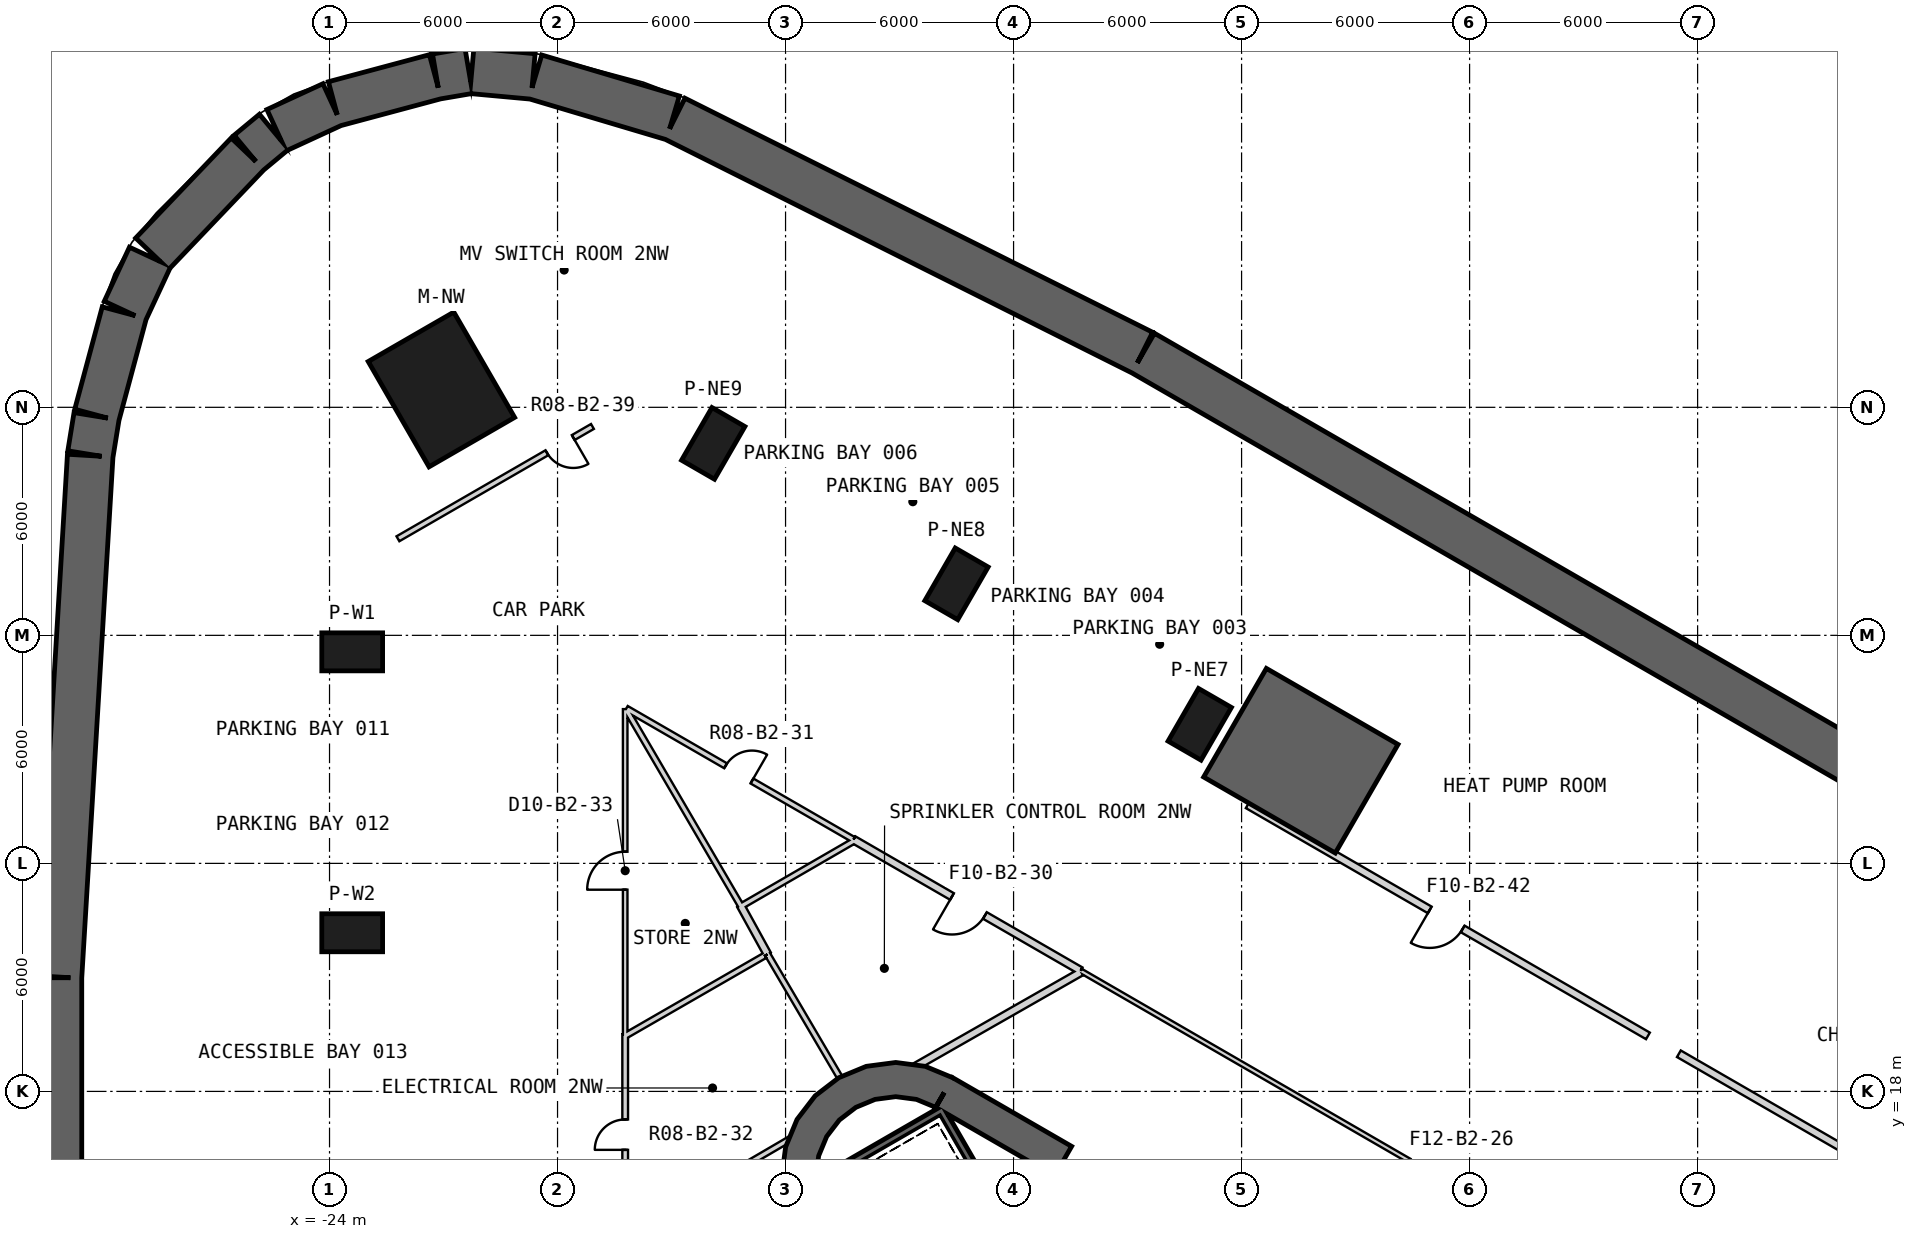
"""IFC4 building model, lengths in metres.
Left out: names, types, materials, properties, quantities, classifications, styles, units other than length and angle.
Written with IfcOpenShell. Run it as: python <this file> out.ifc"""

import sys

from ifc_helpers import new_model, si_unit, direction, frame, frame_2d, origin, origin_2d, place, context, subcontext, project, spatial, polyline, rectangle, outline, extrude, element, fill, save


model = new_model("IFC4")
c1 = context("Model", 3, precision=1e-05, world=origin(), true_north=direction((0.0, 1.0)))
c2 = subcontext(c1, "Body", "Model", "MODEL_VIEW")
j1 = project(units=[si_unit("LENGTHUNIT", "METRE"), si_unit("PLANEANGLEUNIT", "RADIAN")], contexts=[c1])
p1 = place(None, origin())
s1 = spatial("IfcSite", under=j1, at=p1, CompositionType="ELEMENT")
p2 = place(p1, origin())
s2 = spatial("IfcBuilding", under=s1, at=p2, CompositionType="ELEMENT")
p3 = place(p2, frame((0.0, 0.0, -11.0)))
s3 = spatial("IfcBuildingStorey", under=s2, at=p3, CompositionType="ELEMENT", Elevation=-11.0)
p4 = place(p3, frame((-31.117, -20.99, -0.4), z_axis=(0.0, 0.0, 1.0), x_axis=(-6.9786511e-05, 0.999999997565, 0.0)))
e1 = element("IfcWall", 1, at=p4, inside=s3, PredefinedType="SHEAR", context=c2, shape_type="SweptSolid", body=[
    extrude(rectangle(XDim=41.981, YDim=1.2, at=frame_2d((20.99, 0.0))), origin(), (0.0, 0.0, 1.0), 5.9),
])
p5 = place(p3, frame((-31.119, 21.009, -0.4), z_axis=(0.0, 0.0, 1.0), x_axis=(0.059805921037, 0.998210023897, 0.0)))
e2 = element("IfcWall", 2, at=p5, inside=s3, PredefinedType="SHEAR", context=c2, shape_type="SweptSolid", body=[
    extrude(rectangle(XDim=13.745, YDim=1.2, at=frame_2d((6.873, 0.0))), origin(), (0.0, 0.0, 1.0), 5.9),
])
p6 = place(p3, frame((-30.294, 34.759, -0.4), z_axis=(0.0, 0.0, 1.0), x_axis=(0.16003956503, 0.987110600503, 0.0)))
e3 = element("IfcWall", 3, at=p6, inside=s3, PredefinedType="SHEAR", context=c2, shape_type="SweptSolid", body=[
    extrude(rectangle(XDim=1.018, YDim=1.2, at=frame_2d((0.509, 0.0))), origin(), (0.0, 0.0, 1.0), 5.9),
])
p7 = place(p3, frame((-30.125, 35.793, -0.4), z_axis=(0.0, 0.0, 1.0), x_axis=(0.259502793188, 0.965742357116, 0.0)))
e4 = element("IfcWall", 4, at=p7, inside=s3, PredefinedType="SHEAR", context=c2, shape_type="SweptSolid", body=[
    extrude(rectangle(XDim=2.791, YDim=1.2, at=frame_2d((1.395, 0.0))), origin(), (0.0, 0.0, 1.0), 5.9),
])
p8 = place(p3, frame((-29.383, 38.537, -0.4), z_axis=(0.0, 0.0, 1.0), x_axis=(0.421709930533, 0.906730794938, 0.0)))
e5 = element("IfcWall", 5, at=p8, inside=s3, PredefinedType="SHEAR", context=c2, shape_type="SweptSolid", body=[
    extrude(rectangle(XDim=1.57, YDim=1.2, at=frame_2d((0.785, 0.0))), origin(), (0.0, 0.0, 1.0), 5.9),
])
p9 = place(p3, frame((-28.666, 40.041, -0.4), z_axis=(0.0, 0.0, 1.0), x_axis=(0.69065439455, 0.723184974463, 0.0)))
e6 = element("IfcWall", 6, at=p9, inside=s3, PredefinedType="SHEAR", context=c2, shape_type="SweptSolid", body=[
    extrude(rectangle(XDim=3.64, YDim=1.2, at=frame_2d((1.82, 0.0))), origin(), (0.0, 0.0, 1.0), 5.9),
])
p10 = place(p3, frame((-26.127, 42.697, -0.4), z_axis=(0.0, 0.0, 1.0), x_axis=(0.769608956925, 0.638515507581, 0.0)))
e7 = element("IfcWall", 7, at=p10, inside=s3, PredefinedType="SHEAR", context=c2, shape_type="SweptSolid", body=[
    extrude(rectangle(XDim=0.864, YDim=1.2, at=frame_2d((0.432, 0.0))), origin(), (0.0, 0.0, 1.0), 5.9),
])
p11 = place(p3, frame((-25.396, 43.29, -0.4), z_axis=(0.0, 0.0, 1.0), x_axis=(0.908153077633, 0.418638253848, 0.0)))
e8 = element("IfcWall", 8, at=p11, inside=s3, PredefinedType="SHEAR", context=c2, shape_type="SweptSolid", body=[
    extrude(rectangle(XDim=1.622, YDim=1.2, at=frame_2d((0.811, 0.0))), origin(), (0.0, 0.0, 1.0), 5.9),
])
p12 = place(p3, frame((-23.875, 43.987, -0.4), z_axis=(0.0, 0.0, 1.0), x_axis=(0.965929438516, 0.258805563714, 0.0)))
e9 = element("IfcWall", 9, at=p12, inside=s3, PredefinedType="SHEAR", context=c2, shape_type="SweptSolid", body=[
    extrude(rectangle(XDim=2.752, YDim=1.2, at=frame_2d((1.376, 0.0))), origin(), (0.0, 0.0, 1.0), 5.9),
])
p13 = place(p3, frame((-21.189, 44.705, -0.4), z_axis=(0.0, 0.0, 1.0), x_axis=(0.98573984113, 0.168276455894, 0.0)))
e10 = element("IfcWall", 10, at=p13, inside=s3, PredefinedType="SHEAR", context=c2, shape_type="SweptSolid", body=[
    extrude(rectangle(XDim=0.868, YDim=1.2, at=frame_2d((0.434, 0.0))), origin(), (0.0, 0.0, 1.0), 5.9),
])
p14 = place(p3, frame((-20.256, 44.854, -0.4), z_axis=(0.0, 0.0, 1.0), x_axis=(0.995812438951, -0.091419836086, 0.0)))
e11 = element("IfcWall", 11, at=p14, inside=s3, PredefinedType="SHEAR", context=c2, shape_type="SweptSolid", body=[
    extrude(rectangle(XDim=1.618, YDim=1.2, at=frame_2d((0.809, 0.0))), origin(), (0.0, 0.0, 1.0), 5.9),
])
p15 = place(p3, frame((-18.586, 44.695, -0.4), z_axis=(0.0, 0.0, 1.0), x_axis=(0.958421787055, -0.285355354075, 0.0)))
e12 = element("IfcWall", 12, at=p15, inside=s3, PredefinedType="SHEAR", context=c2, shape_type="SweptSolid", body=[
    extrude(rectangle(XDim=3.778, YDim=1.2, at=frame_2d((1.889, 0.0))), origin(), (0.0, 0.0, 1.0), 5.9),
])
p16 = place(p3, frame((-14.917, 43.597, -0.4), z_axis=(0.0, 0.0, 1.0), x_axis=(0.894256838825, -0.447554137747, 0.0)))
e13 = element("IfcWall", 13, at=p16, inside=s3, PredefinedType="SHEAR", context=c2, shape_type="SweptSolid", body=[
    extrude(rectangle(XDim=13.763, YDim=1.2, at=frame_2d((6.882, 0.0))), origin(), (0.0, 0.0, 1.0), 5.9),
])
p17 = place(p3, frame((-2.593, 37.429, -0.4), z_axis=(0.0, 0.0, 1.0), x_axis=(0.866166543136, -0.499755459752, 0.0)))
e14 = element("IfcWall", 14, at=p17, inside=s3, PredefinedType="SHEAR", context=c2, shape_type="SweptSolid", body=[
    extrude(rectangle(XDim=41.622, YDim=1.2, at=frame_2d((20.811, 0.0))), origin(), (0.0, 0.0, 1.0), 5.9),
])
p18 = place(p3, frame((-21.056, 36.469, -0.4), z_axis=(0.0, 0.0, 1.0), x_axis=(-0.5, 0.866025403784, 0.0)))
e15 = element("IfcColumn", 15, at=p18, inside=s3, PredefinedType="COLUMN", context=c2, shape_type="SweptSolid", body=[
    extrude(rectangle(XDim=3.2, YDim=2.6, at=origin_2d()), origin(), (0.0, 0.0, 1.0), 5.9),
])
for number, where, z_axis, x_axis in (
    (16, (-23.403, 29.566, -0.4), (0.0, 0.0, 1.0), (-1.0, 0.0, 0.0)),
    (17, (-23.403, 22.174, -0.4), (0.0, 0.0, 1.0), (-1.0, 0.0, 0.0)),
    (18, (-1.101, 27.659, -0.4), (0.0, 0.0, 1.0), (0.5, 0.866, 0.0)),
    (19, (-7.502, 31.355, -0.4), (0.0, 0.0, 1.0), (0.5, 0.866, 0.0)),
    (20, (-13.903, 35.051, -0.4), (0.0, 0.0, 1.0), (0.5, 0.866, 0.0)),
):
    element("IfcColumn", number, at=place(p3, frame(where, z_axis=z_axis, x_axis=x_axis)), inside=s3, PredefinedType="COLUMN", context=c2, shape_type="SweptSolid", body=[
        extrude(rectangle(XDim=1.6, YDim=1.0, at=origin_2d()), origin(), (0.0, 0.0, 1.0), 5.9),
    ])
p19 = place(p3, frame((19.475, 2.208, -0.4), z_axis=(0.0, 0.0, 1.0), x_axis=(-0.866028369851, 0.499994862586, 0.0)))
e21 = element("IfcWall", 21, at=p19, inside=s3, PredefinedType="SHEAR", context=c2, shape_type="SweptSolid", body=[
    extrude(rectangle(XDim=31.523, YDim=0.9, at=frame_2d((15.762, 0.0))), origin(), (0.0, 0.0, 1.0), 5.9),
])
p20 = place(p19, frame((3.612, 0.0, 0.4)))
e22 = element("IfcOpeningElement", 22, at=p20, cuts=e21, PredefinedType="OPENING", context=c2, shape_type="SweptSolid", body=[
    extrude(rectangle(XDim=1.2, YDim=2.4, at=frame_2d((0.6, 1.2))), frame((0.0, 0.46, 0.0), z_axis=(0.0, -1.0, 0.0), x_axis=(1.0, 0.0, 0.0)), (0.0, 0.0, 1.0), 0.92),
])
p21 = place(p19, frame((26.712, 0.0, 0.4)))
e23 = element("IfcOpeningElement", 23, at=p21, cuts=e21, PredefinedType="OPENING", context=c2, shape_type="SweptSolid", body=[
    extrude(rectangle(XDim=1.2, YDim=2.4, at=frame_2d((0.6, 1.2))), frame((0.0, 0.46, 0.0), z_axis=(0.0, -1.0, 0.0), x_axis=(1.0, 0.0, 0.0)), (0.0, 0.0, 1.0), 0.92),
])
p22 = place(p3, frame((0.0, 0.0, -0.4)))
e24 = element("IfcWall", 24, at=p22, inside=s3, PredefinedType="SHEAR", context=c2, shape_type="SweptSolid", body=[
    extrude(outline(polyline([(-7.6, 18.36), (-8.323, 18.659), (-9.1, 18.762), (-9.876, 18.659), (-10.6, 18.36), (-11.221, 17.883), (-11.698, 17.262), (-11.998, 16.538), (-12.1, 15.762), (-11.2, 15.762), (-11.128, 16.305), (-10.919, 16.812), (-10.585, 17.247), (-10.15, 17.58), (-9.644, 17.79), (-9.1, 17.862), (-8.556, 17.79), (-8.05, 17.58), (-7.6, 18.36)])), origin(), (0.0, 0.0, 1.0), 5.9),
])
p23 = place(p3, frame((0.0, 0.0, -0.4)))
e25 = element("IfcWall", 25, at=p23, inside=s3, PredefinedType="SHEAR", context=c2, shape_type="SweptSolid", body=[
    extrude(outline(polyline([(4.116, 27.13), (0.652, 29.13), (-0.998, 26.272), (2.467, 24.272), (4.116, 27.13)])), origin(), (0.0, 0.0, 1.0), 5.9),
])
p24 = place(p3, frame((-7.818, 17.541, -0.4), z_axis=(0.0, 0.0, 1.0), x_axis=(-0.866044365799, -0.499967155389, 0.0)))
e26 = element("IfcWall", 26, at=p24, inside=s3, PredefinedType="SHEAR", context=c2, shape_type="SweptSolid", body=[
    extrude(rectangle(XDim=3.8, YDim=0.2, at=frame_2d((1.9, 0.0))), origin(), (0.0, 0.0, 1.0), 5.5),
])
p25 = place(p3, frame((-7.854, 17.405, -0.4), z_axis=(0.0, 0.0, 1.0), x_axis=(0.499997992926, -0.866026562566, 0.0)))
e27 = element("IfcWall", 27, at=p25, inside=s3, PredefinedType="SHEAR", context=c2, shape_type="SweptSolid", body=[
    extrude(rectangle(XDim=7.9, YDim=0.2, at=frame_2d((3.95, 0.0))), origin(), (0.0, 0.0, 1.0), 5.5),
])
p26 = place(p3, frame((30.376, 1.169, 0.0), z_axis=(0.0, 0.0, 1.0), x_axis=(-0.865777000343, 0.500430000777, 0.0)))
e28 = element("IfcWall", 28, at=p26, inside=s3, PredefinedType="PARTITIONING", context=c2, shape_type="SweptSolid", body=[
    extrude(rectangle(XDim=39.978, YDim=0.12, at=frame_2d((19.989, 0.0))), origin(), (0.0, 0.0, 1.0), 4.18),
])
p27 = place(p26, frame((28.784, 0.0, 0.0)))
e29 = element("IfcOpeningElement", 29, at=p27, cuts=e28, PredefinedType="OPENING", context=c2, shape_type="SweptSolid", body=[
    extrude(rectangle(XDim=1.2, YDim=2.4, at=frame_2d((0.6, 1.2))), frame((0.0, 0.07, 0.0), z_axis=(0.0, -1.0, 0.0), x_axis=(1.0, 0.0, 0.0)), (0.0, 0.0, 1.0), 0.14),
])
p28 = place(p26, frame((9.984, 0.0, 0.0)))
e30 = element("IfcOpeningElement", 30, at=p28, cuts=e28, PredefinedType="OPENING", context=c2, shape_type="SweptSolid", body=[
    extrude(rectangle(XDim=1.2, YDim=2.4, at=frame_2d((0.6, 1.2))), frame((0.0, 0.07, 0.0), z_axis=(0.0, -1.0, 0.0), x_axis=(1.0, 0.0, 0.0)), (0.0, 0.0, 1.0), 0.14),
])
p29 = place(p3, frame((-16.22, 19.501, 0.0), z_axis=(0.0, 0.0, 1.0), x_axis=(0.0, 1.0, 0.0)))
e31 = element("IfcWall", 31, at=p29, inside=s3, PredefinedType="PARTITIONING", context=c2, shape_type="SweptSolid", body=[
    extrude(rectangle(XDim=8.558, YDim=0.12, at=frame_2d((4.279, 0.0))), origin(), (0.0, 0.0, 1.0), 4.07),
])
p30 = place(p29, frame((3.806, 0.0, 0.0)))
e32 = element("IfcOpeningElement", 32, at=p30, cuts=e31, PredefinedType="OPENING", context=c2, shape_type="SweptSolid", body=[
    extrude(rectangle(XDim=1.0, YDim=2.1, at=frame_2d((0.5, 1.05))), frame((0.0, 0.07, 0.0), z_axis=(0.0, -1.0, 0.0), x_axis=(1.0, 0.0, 0.0)), (0.0, 0.0, 1.0), 0.14),
])
p31 = place(p3, frame((-4.236, 21.175, 0.0), z_axis=(0.0, 0.0, 1.0), x_axis=(-0.86602711848, 0.499997030048, 0.0)))
e33 = element("IfcWall", 33, at=p31, inside=s3, PredefinedType="PARTITIONING", context=c2, shape_type="SweptSolid", body=[
    extrude(rectangle(XDim=6.901, YDim=0.2, at=frame_2d((3.451, 0.0))), origin(), (0.0, 0.0, 1.0), 4.18),
])
p32 = place(p31, frame((2.907, 0.0, 0.0)))
e34 = element("IfcOpeningElement", 34, at=p32, cuts=e33, PredefinedType="OPENING", context=c2, shape_type="SweptSolid", body=[
    extrude(rectangle(XDim=1.0, YDim=2.1, at=frame_2d((0.5, 1.05))), frame((0.0, 0.11, 0.0), z_axis=(0.0, -1.0, 0.0), x_axis=(1.0, 0.0, 0.0)), (0.0, 0.0, 1.0), 0.22),
])
p33 = place(p3, frame((-10.213, 24.626, 0.0), z_axis=(0.0, 0.0, 1.0), x_axis=(-0.866020644514, 0.500008243208, 0.0)))
e35 = element("IfcWall", 35, at=p33, inside=s3, PredefinedType="PLUMBINGWALL", context=c2, shape_type="SweptSolid", body=[
    extrude(rectangle(XDim=6.902, YDim=0.15, at=frame_2d((3.451, 0.0))), origin(), (0.0, 0.0, 1.0), 4.07),
])
p34 = place(p33, frame((3.084, 0.0, 0.0)))
e36 = element("IfcOpeningElement", 36, at=p34, cuts=e35, PredefinedType="OPENING", context=c2, shape_type="SweptSolid", body=[
    extrude(rectangle(XDim=0.8, YDim=2.1, at=frame_2d((0.4, 1.05))), frame((0.0, 0.085, 0.0), z_axis=(0.0, -1.0, 0.0), x_axis=(1.0, 0.0, 0.0)), (0.0, 0.0, 1.0), 0.17),
])
p35 = place(p3, frame((-16.22, 14.256, 0.0), z_axis=(0.0, 0.0, 1.0), x_axis=(0.0, 1.0, 0.0)))
e37 = element("IfcWall", 37, at=p35, inside=s3, PredefinedType="PLUMBINGWALL", context=c2, shape_type="SweptSolid", body=[
    extrude(rectangle(XDim=5.245, YDim=0.15, at=frame_2d((2.623, 0.0))), origin(), (0.0, 0.0, 1.0), 4.28),
])
p36 = place(p35, frame((2.206, 0.0, 0.0)))
e38 = element("IfcOpeningElement", 38, at=p36, cuts=e37, PredefinedType="OPENING", context=c2, shape_type="SweptSolid", body=[
    extrude(rectangle(XDim=0.8, YDim=2.1, at=frame_2d((0.4, 1.05))), frame((0.0, 0.085, 0.0), z_axis=(0.0, -1.0, 0.0), x_axis=(1.0, 0.0, 0.0)), (0.0, 0.0, 1.0), 0.17),
])
p37 = place(p3, frame((-17.081, 35.496, 0.0), z_axis=(0.0, 0.0, 1.0), x_axis=(-0.866020498397, -0.500008496284, 0.0)))
e39 = element("IfcWall", 39, at=p37, inside=s3, PredefinedType="PLUMBINGWALL", context=c2, shape_type="SweptSolid", body=[
    extrude(rectangle(XDim=5.911, YDim=0.15, at=frame_2d((2.955, 0.0))), origin(), (0.0, 0.0, 1.0), 4.07),
])
p38 = place(p37, frame((0.583, 0.0, 0.0)))
e40 = element("IfcOpeningElement", 40, at=p38, cuts=e39, PredefinedType="OPENING", context=c2, shape_type="SweptSolid", body=[
    extrude(rectangle(XDim=0.8, YDim=2.1, at=frame_2d((0.4, 1.05))), frame((0.0, 0.085, 0.0), z_axis=(0.0, -1.0, 0.0), x_axis=(1.0, 0.0, 0.0)), (0.0, 0.0, 1.0), 0.17),
])
p39 = place(p3, frame((22.038, 12.911, 0.0), z_axis=(0.0, 0.0, 1.0), x_axis=(-0.866020417952, 0.500008635616, 0.0)))
e41 = element("IfcWall", 41, at=p39, inside=s3, PredefinedType="PARTITIONING", context=c2, shape_type="SweptSolid", body=[
    extrude(rectangle(XDim=12.16, YDim=0.2, at=frame_2d((6.08, 0.0))), origin(), (0.0, 0.0, 1.0), 5.1),
])
p40 = place(p39, frame((5.63, 0.0, 0.0)))
e42 = element("IfcOpeningElement", 42, at=p40, cuts=e41, PredefinedType="OPENING", context=c2, shape_type="SweptSolid", body=[
    extrude(rectangle(XDim=1.0, YDim=2.1, at=frame_2d((0.5, 1.05))), frame((0.0, 0.11, 0.0), z_axis=(0.0, -1.0, 0.0), x_axis=(1.0, 0.0, 0.0)), (0.0, 0.0, 1.0), 0.22),
])
p41 = place(p3, frame((10.693, 19.461, 0.0), z_axis=(0.0, 0.0, 1.0), x_axis=(-0.866020417952, 0.500008635616, 0.0)))
e43 = element("IfcWall", 43, at=p41, inside=s3, PredefinedType="PARTITIONING", context=c2, shape_type="SweptSolid", body=[
    extrude(rectangle(XDim=12.16, YDim=0.2, at=frame_2d((6.08, 0.0))), origin(), (0.0, 0.0, 1.0), 5.1),
])
p42 = place(p41, frame((5.63, 0.0, 0.0)))
e44 = element("IfcOpeningElement", 44, at=p42, cuts=e43, PredefinedType="OPENING", context=c2, shape_type="SweptSolid", body=[
    extrude(rectangle(XDim=1.0, YDim=2.1, at=frame_2d((0.5, 1.05))), frame((0.0, 0.11, 0.0), z_axis=(0.0, -1.0, 0.0), x_axis=(1.0, 0.0, 0.0)), (0.0, 0.0, 1.0), 0.22),
])
p43 = place(p3, frame((-4.22, 21.143, 0.0), z_axis=(0.0, 0.0, 1.0), x_axis=(-0.868530929613, -0.495634970825, 0.0)))
e45 = element("IfcWall", 45, at=p43, inside=s3, PredefinedType="PARTITIONING", context=c2, shape_type="SweptSolid", body=[
    extrude(rectangle(XDim=5.166, YDim=0.2, at=frame_2d((2.583, 0.0))), origin(), (0.0, 0.0, 1.0), 4.18),
])
p44 = place(p3, frame((-11.74, 16.832, 0.0), z_axis=(0.0, 0.0, 1.0), x_axis=(-0.863501067027, -0.504347010741, 0.0)))
e46 = element("IfcWall", 46, at=p44, inside=s3, PredefinedType="PLUMBINGWALL", context=c2, shape_type="SweptSolid", body=[
    extrude(rectangle(XDim=5.166, YDim=0.15, at=frame_2d((2.583, 0.0))), origin(), (0.0, 0.0, 1.0), 4.18),
])
p45 = place(p3, frame((-10.197, 24.594, 0.0), z_axis=(0.0, 0.0, 1.0), x_axis=(-0.865437539194, -0.501016831807, 0.0)))
e47 = element("IfcWall", 47, at=p45, inside=s3, PredefinedType="PLUMBINGWALL", context=c2, shape_type="SweptSolid", body=[
    extrude(rectangle(XDim=3.466, YDim=0.15, at=frame_2d((1.733, 0.0))), origin(), (0.0, 0.0, 1.0), 4.07),
])
p46 = place(p3, frame((-12.475, 21.609, 0.0), z_axis=(0.0, 0.0, 1.0), x_axis=(0.50651186771, -0.862232989318, 0.0)))
e48 = element("IfcWall", 48, at=p46, inside=s3, PredefinedType="PLUMBINGWALL", context=c2, shape_type="SweptSolid", body=[
    extrude(rectangle(XDim=3.905, YDim=0.15, at=frame_2d((1.953, 0.0))), origin(), (0.0, 0.0, 1.0), 4.07),
])
p47 = place(p3, frame((-13.186, 22.898, 0.0), z_axis=(0.0, 0.0, 1.0), x_axis=(0.482147862589, -0.876089857606, 0.0)))
e49 = element("IfcWall", 49, at=p47, inside=s3, PredefinedType="PARTITIONING", context=c2, shape_type="SweptSolid", body=[
    extrude(rectangle(XDim=1.472, YDim=0.2, at=frame_2d((0.736, 0.0))), origin(), (0.0, 0.0, 1.0), 4.07),
])
p48 = place(p3, frame((-13.186, 22.898, 0.0), z_axis=(0.0, 0.0, 1.0), x_axis=(-0.504338258722, 0.863506178779, 0.0)))
e50 = element("IfcWall", 50, at=p48, inside=s3, PredefinedType="PLUMBINGWALL", context=c2, shape_type="SweptSolid", body=[
    extrude(rectangle(XDim=5.977, YDim=0.15, at=frame_2d((2.989, 0.0))), origin(), (0.0, 0.0, 1.0), 4.07),
])
p49 = place(p3, frame((-12.544, 21.577, 0.0), z_axis=(0.0, 0.0, 1.0), x_axis=(-0.866492758114, -0.499189643458, 0.0)))
e51 = element("IfcWall", 51, at=p49, inside=s3, PredefinedType="PLUMBINGWALL", context=c2, shape_type="SweptSolid", body=[
    extrude(rectangle(XDim=4.219, YDim=0.15, at=frame_2d((2.109, 0.0))), origin(), (0.0, 0.0, 1.0), 4.07),
])
p50 = place(p32, origin())
e52 = element("IfcDoor", 52, at=p50, inside=s3, OperationType="SINGLE_SWING_RIGHT", PredefinedType="USERDEFINED", context=c2, shape_type="SweptSolid", body=[
    extrude(rectangle(XDim=1.0, YDim=2.1, at=frame_2d((0.5, 1.05))), frame((0.0, 0.025, 0.0), z_axis=(0.0, -1.0, 0.0), x_axis=(1.0, 0.0, 0.0)), (0.0, 0.0, 1.0), 0.05),
])
fill(e34, e52)
p51 = place(p34, origin())
e53 = element("IfcDoor", 53, at=p51, inside=s3, OperationType="SINGLE_SWING_LEFT", PredefinedType="USERDEFINED", context=c2, shape_type="SweptSolid", body=[
    extrude(rectangle(XDim=0.8, YDim=2.1, at=frame_2d((0.4, 1.05))), frame((0.0, 0.025, 0.0), z_axis=(0.0, -1.0, 0.0), x_axis=(1.0, 0.0, 0.0)), (0.0, 0.0, 1.0), 0.05),
])
fill(e36, e53)
p52 = place(p36, origin())
e54 = element("IfcDoor", 54, at=p52, inside=s3, OperationType="SINGLE_SWING_LEFT", PredefinedType="USERDEFINED", context=c2, shape_type="SweptSolid", body=[
    extrude(rectangle(XDim=0.8, YDim=2.1, at=frame_2d((0.4, 1.05))), frame((0.0, 0.025, 0.0), z_axis=(0.0, -1.0, 0.0), x_axis=(1.0, 0.0, 0.0)), (0.0, 0.0, 1.0), 0.05),
])
fill(e38, e54)
p53 = place(p30, origin())
e55 = element("IfcDoor", 55, at=p53, inside=s3, OperationType="SINGLE_SWING_LEFT", PredefinedType="NOTDEFINED", context=c2, shape_type="SweptSolid", body=[
    extrude(rectangle(XDim=1.0, YDim=2.1, at=frame_2d((0.5, 1.05))), frame((0.0, 0.025, 0.0), z_axis=(0.0, -1.0, 0.0), x_axis=(1.0, 0.0, 0.0)), (0.0, 0.0, 1.0), 0.05),
])
fill(e32, e55)
p54 = place(p38, origin())
e56 = element("IfcDoor", 56, at=p54, inside=s3, OperationType="SINGLE_SWING_LEFT", PredefinedType="USERDEFINED", context=c2, shape_type="SweptSolid", body=[
    extrude(rectangle(XDim=0.8, YDim=2.1, at=frame_2d((0.4, 1.05))), frame((0.0, 0.025, 0.0), z_axis=(0.0, -1.0, 0.0), x_axis=(1.0, 0.0, 0.0)), (0.0, 0.0, 1.0), 0.05),
])
fill(e40, e56)
p55 = place(p42, origin())
e57 = element("IfcDoor", 57, at=p55, inside=s3, OperationType="SINGLE_SWING_RIGHT", PredefinedType="USERDEFINED", context=c2, shape_type="SweptSolid", body=[
    extrude(rectangle(XDim=1.0, YDim=2.1, at=frame_2d((0.5, 1.05))), frame((0.0, 0.025, 0.0), z_axis=(0.0, -1.0, 0.0), x_axis=(1.0, 0.0, 0.0)), (0.0, 0.0, 1.0), 0.05),
])
fill(e44, e57)
save(model, sys.argv[1])
